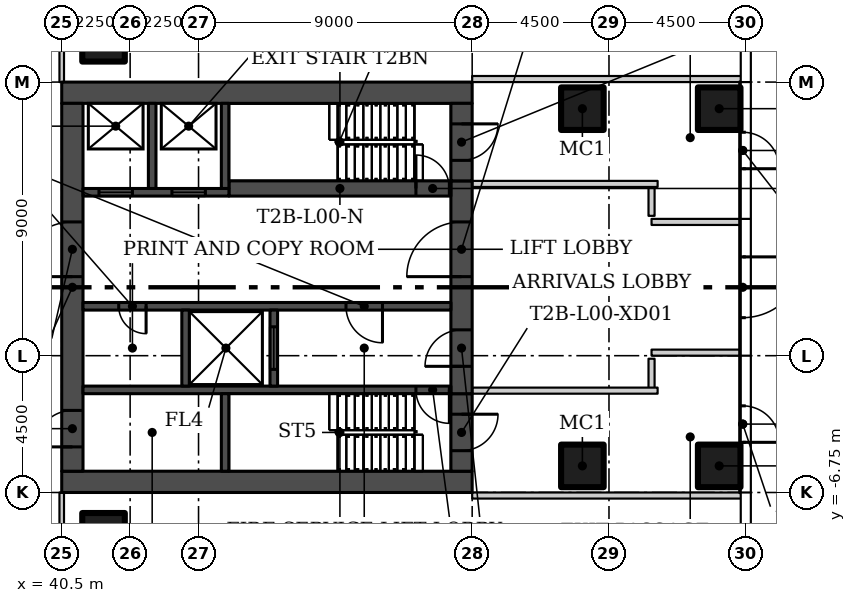
"""IFC4 building model, lengths in metres.
Left out: names, types, materials, properties, quantities, classifications, styles, units other than length and angle.
Written with IfcOpenShell. Run it as: python <this file> out.ifc"""

import sys

from ifc_helpers import new_model, si_unit, direction, frame, frame_2d, origin, origin_2d, place, context, subcontext, project, spatial, rectangle, hollow_rectangle, extrude, element, fill, save


model = new_model("IFC4")
c1 = context("Model", 3, precision=1e-05, world=origin(), true_north=direction((0.0, 1.0)))
c2 = subcontext(c1, "Body", "Model", "MODEL_VIEW")
j1 = project(units=[si_unit("LENGTHUNIT", "METRE"), si_unit("PLANEANGLEUNIT", "RADIAN")], contexts=[c1])
p1 = place(None, origin())
s1 = spatial("IfcSite", under=j1, at=p1, CompositionType="ELEMENT")
p2 = place(p1, origin())
s2 = spatial("IfcBuilding", under=s1, at=p2, CompositionType="ELEMENT")
p3 = place(p2, origin())
s3 = spatial("IfcBuildingStorey", under=s2, at=p3, CompositionType="ELEMENT", Elevation=0.0)
for number, where in (
    (1, (41.875, 8.125, 0.0)),
    (2, (41.875, -8.125, 0.0)),
    (3, (57.625, -5.875, 0.0)),
    (4, (62.125, -5.875, 0.0)),
    (5, (57.625, 5.875, 0.0)),
    (6, (62.125, 5.875, 0.0)),
):
    element("IfcColumn", number, at=place(p3, frame(where)), inside=s3, PredefinedType="COLUMN", context=c2, shape_type="SweptSolid", body=[
        extrude(hollow_rectangle(XDim=1.4, YDim=1.4, WallThickness=0.06, at=origin_2d()), origin(), (0.0, 0.0, 1.0), 6.1),
    ])
p4 = place(p3, frame((59.9, 2.15, 0.0)))
e7 = element("IfcWall", 7, at=p4, inside=s3, PredefinedType="PARTITIONING", context=c2, shape_type="SweptSolid", body=[
    extrude(rectangle(XDim=3.005, YDim=0.2, at=frame_2d((1.502, 0.0))), origin(), (0.0, 0.0, 1.0), 6.1),
])
for number, where, z_axis, x_axis in (
    (8, (59.9, 3.4, 0.0), (0.0, 0.0, 1.0), (0.0, -1.0, 0.0)),
    (9, (59.9, -2.35, 0.0), (0.0, 0.0, 1.0), (0.0, -1.0, 0.0)),
):
    element("IfcWall", number, at=place(p3, frame(where, z_axis=z_axis, x_axis=x_axis)), inside=s3, PredefinedType="PARTITIONING", context=c2, shape_type="SweptSolid", body=[
        extrude(rectangle(XDim=1.05, YDim=0.2, at=frame_2d((0.525, 0.0))), origin(), (0.0, 0.0, 1.0), 6.1),
    ])
p5 = place(p3, frame((54.0, 3.4, 0.0)))
e10 = element("IfcWall", 10, at=p5, inside=s3, PredefinedType="PARTITIONING", context=c2, shape_type="SweptSolid", body=[
    extrude(rectangle(XDim=6.1, YDim=0.2, at=frame_2d((3.05, 0.0))), origin(), (0.0, 0.0, 1.0), 6.1),
])
p6 = place(p3, frame((62.905, 6.85, 0.0), z_axis=(0.0, 0.0, 1.0), x_axis=(-1.0, 0.0, 0.0)))
e11 = element("IfcWall", 11, at=p6, inside=s3, PredefinedType="PARTITIONING", context=c2, shape_type="SweptSolid", body=[
    extrude(rectangle(XDim=8.905, YDim=0.2, at=frame_2d((4.453, 0.0))), origin(), (0.0, 0.0, 1.0), 6.1),
])
p7 = place(p3, frame((60.1, -3.4, 0.0), z_axis=(0.0, 0.0, 1.0), x_axis=(-1.0, 0.0, 0.0)))
e12 = element("IfcWall", 12, at=p7, inside=s3, PredefinedType="PARTITIONING", context=c2, shape_type="SweptSolid", body=[
    extrude(rectangle(XDim=6.1, YDim=0.2, at=frame_2d((3.05, 0.0))), origin(), (0.0, 0.0, 1.0), 6.1),
])
p8 = place(p3, frame((62.905, -2.15, 0.0), z_axis=(0.0, 0.0, 1.0), x_axis=(-1.0, 0.0, 0.0)))
e13 = element("IfcWall", 13, at=p8, inside=s3, PredefinedType="PARTITIONING", context=c2, shape_type="SweptSolid", body=[
    extrude(rectangle(XDim=3.005, YDim=0.2, at=frame_2d((1.502, 0.0))), origin(), (0.0, 0.0, 1.0), 6.1),
])
p9 = place(p3, frame((54.0, -6.85, 0.0)))
e14 = element("IfcWall", 14, at=p9, inside=s3, PredefinedType="PARTITIONING", context=c2, shape_type="SweptSolid", body=[
    extrude(rectangle(XDim=8.905, YDim=0.2, at=frame_2d((4.453, 0.0))), origin(), (0.0, 0.0, 1.0), 6.1),
])
p10 = place(p3, frame((40.5, -17.275, 0.0), z_axis=(0.0, 0.0, 1.0), x_axis=(0.0, 1.0, 0.0)))
e15 = element("IfcWall", 15, at=p10, inside=s3, PredefinedType="PARTITIONING", context=c2, shape_type="SweptSolid", body=[
    extrude(rectangle(XDim=10.525, YDim=0.15, at=frame_2d((5.262, 0.0))), origin(), (0.0, 0.0, 1.0), 6.1),
])
p11 = place(p10, frame((4.325, 0.0, 0.0)))
e16 = element("IfcOpeningElement", 16, at=p11, cuts=e15, PredefinedType="OPENING", context=c2, shape_type="SweptSolid", body=[
    extrude(rectangle(XDim=1.8, YDim=2.4, at=frame_2d((0.9, 1.2))), frame((0.0, 0.085, 0.0), z_axis=(0.0, -1.0, 0.0), x_axis=(1.0, 0.0, 0.0)), (0.0, 0.0, 1.0), 0.17),
])
p12 = place(p3, frame((40.5, 6.75, 0.0), z_axis=(0.0, 0.0, 1.0), x_axis=(0.0, 1.0, 0.0)))
e17 = element("IfcWall", 17, at=p12, inside=s3, PredefinedType="PARTITIONING", context=c2, shape_type="SweptSolid", body=[
    extrude(rectangle(XDim=6.025, YDim=0.15, at=frame_2d((3.012, 0.0))), origin(), (0.0, 0.0, 1.0), 6.1),
])
p13 = place(p12, frame((2.15, 0.0, 0.0)))
e18 = element("IfcOpeningElement", 18, at=p13, cuts=e17, PredefinedType="OPENING", context=c2, shape_type="SweptSolid", body=[
    extrude(rectangle(XDim=1.8, YDim=2.4, at=frame_2d((0.9, 1.2))), frame((0.0, 0.085, 0.0), z_axis=(0.0, -1.0, 0.0), x_axis=(1.0, 0.0, 0.0)), (0.0, 0.0, 1.0), 0.17),
])
p14 = place(p3, frame((62.9, 6.757, 0.0), z_axis=(0.0, 0.0, 1.0), x_axis=(0.0, -1.0, 0.0)))
e19 = element("IfcWall", 19, at=p14, inside=s3, PredefinedType="SOLIDWALL", context=c2, shape_type="SweptSolid", body=[
    extrude(rectangle(XDim=4.514, YDim=0.2, at=frame_2d((2.257, 0.0))), origin(), (0.0, 0.0, 1.0), 3.0),
])
p15 = place(p14, frame((1.657, 0.0, 0.0)))
e20 = element("IfcOpeningElement", 20, at=p15, cuts=e19, PredefinedType="OPENING", context=c2, shape_type="SweptSolid", body=[
    extrude(rectangle(XDim=1.2, YDim=2.4, at=frame_2d((0.6, 1.2))), frame((0.0, 0.11, 0.0), z_axis=(0.0, -1.0, 0.0), x_axis=(1.0, 0.0, 0.0)), (0.0, 0.0, 1.0), 0.22),
])
p16 = place(p3, frame((62.9, -2.243, 0.0), z_axis=(0.0, 0.0, 1.0), x_axis=(0.0, -1.0, 0.0)))
e21 = element("IfcWall", 21, at=p16, inside=s3, PredefinedType="SOLIDWALL", context=c2, shape_type="SweptSolid", body=[
    extrude(rectangle(XDim=4.514, YDim=0.2, at=frame_2d((2.257, 0.0))), origin(), (0.0, 0.0, 1.0), 3.0),
])
p17 = place(p16, frame((1.657, 0.0, 0.0)))
e22 = element("IfcOpeningElement", 22, at=p17, cuts=e21, PredefinedType="OPENING", context=c2, shape_type="SweptSolid", body=[
    extrude(rectangle(XDim=1.2, YDim=2.4, at=frame_2d((0.6, 1.2))), frame((0.0, 0.11, 0.0), z_axis=(0.0, -1.0, 0.0), x_axis=(1.0, 0.0, 0.0)), (0.0, 0.0, 1.0), 0.22),
])
p18 = place(p3, frame((62.9, 2.217, 0.0), z_axis=(0.0, 0.0, 1.0), x_axis=(0.0, -1.0, 0.0)))
e23 = element("IfcWall", 23, at=p18, inside=s3, PredefinedType="SOLIDWALL", context=c2, shape_type="SweptSolid", body=[
    extrude(rectangle(XDim=4.434, YDim=0.2, at=frame_2d((2.217, 0.0))), origin(), (0.0, 0.0, 1.0), 3.0),
])
p19 = place(p18, frame((1.217, 0.0, 0.0)))
e24 = element("IfcOpeningElement", 24, at=p19, cuts=e23, PredefinedType="OPENING", context=c2, shape_type="SweptSolid", body=[
    extrude(rectangle(XDim=2.0, YDim=2.4, at=frame_2d((1.0, 1.2))), frame((0.0, 0.11, 0.0), z_axis=(0.0, -1.0, 0.0), x_axis=(1.0, 0.0, 0.0)), (0.0, 0.0, 1.0), 0.22),
])
for number, where, z_axis, x_axis in (
    (25, (54.0, -6.4, 0.0), (0.0, 0.0, 1.0), (-1.0, 0.0, 0.0)),
    (26, (54.0, 6.4, 0.0), (0.0, 0.0, 1.0), (-1.0, 0.0, 0.0)),
):
    element("IfcWall", number, at=place(p3, frame(where, z_axis=z_axis, x_axis=x_axis)), inside=s3, PredefinedType="SHEAR", context=c2, shape_type="SweptSolid", body=[
        extrude(rectangle(XDim=13.5, YDim=0.7, at=frame_2d((6.75, 0.0))), origin(), (0.0, 0.0, 1.0), 6.1),
    ])
p20 = place(p3, frame((53.65, -3.5, 0.0), z_axis=(0.0, 0.0, 1.0), x_axis=(0.0, -1.0, 0.0)))
e27 = element("IfcWall", 27, at=p20, inside=s3, PredefinedType="SHEAR", context=c2, shape_type="SweptSolid", body=[
    extrude(rectangle(XDim=2.55, YDim=0.7, at=frame_2d((1.275, 0.0))), origin(), (0.0, 0.0, 1.0), 6.1),
])
p21 = place(p20, frame((0.675, 0.0, 0.0)))
e28 = element("IfcOpeningElement", 28, at=p21, cuts=e27, PredefinedType="OPENING", context=c2, shape_type="SweptSolid", body=[
    extrude(rectangle(XDim=1.2, YDim=2.4, at=frame_2d((0.6, 1.2))), frame((0.0, 0.36, 0.0), z_axis=(0.0, -1.0, 0.0), x_axis=(1.0, 0.0, 0.0)), (0.0, 0.0, 1.0), 0.72),
])
p22 = place(p3, frame((53.65, -3.5, 0.0), z_axis=(0.0, 0.0, 1.0), x_axis=(0.0, 1.0, 0.0)))
e29 = element("IfcWall", 29, at=p22, inside=s3, PredefinedType="SHEAR", context=c2, shape_type="SweptSolid", body=[
    extrude(rectangle(XDim=7.0, YDim=0.7, at=frame_2d((3.5, 0.0))), origin(), (0.0, 0.0, 1.0), 6.1),
])
p23 = place(p22, frame((0.9, 0.0, 0.0)))
e30 = element("IfcOpeningElement", 30, at=p23, cuts=e29, PredefinedType="OPENING", context=c2, shape_type="SweptSolid", body=[
    extrude(rectangle(XDim=1.2, YDim=2.1, at=frame_2d((0.6, 1.05))), frame((0.0, 0.36, 0.0), z_axis=(0.0, -1.0, 0.0), x_axis=(1.0, 0.0, 0.0)), (0.0, 0.0, 1.0), 0.72),
])
p24 = place(p22, frame((3.85, 0.0, 0.0)))
e31 = element("IfcOpeningElement", 31, at=p24, cuts=e29, PredefinedType="OPENING", context=c2, shape_type="SweptSolid", body=[
    extrude(rectangle(XDim=1.8, YDim=2.4, at=frame_2d((0.9, 1.2))), frame((0.0, 0.36, 0.0), z_axis=(0.0, -1.0, 0.0), x_axis=(1.0, 0.0, 0.0)), (0.0, 0.0, 1.0), 0.72),
])
p25 = place(p3, frame((53.65, 6.05, 0.0), z_axis=(0.0, 0.0, 1.0), x_axis=(0.0, -1.0, 0.0)))
e32 = element("IfcWall", 32, at=p25, inside=s3, PredefinedType="SHEAR", context=c2, shape_type="SweptSolid", body=[
    extrude(rectangle(XDim=2.55, YDim=0.7, at=frame_2d((1.275, 0.0))), origin(), (0.0, 0.0, 1.0), 6.1),
])
p26 = place(p25, frame((0.675, 0.0, 0.0)))
e33 = element("IfcOpeningElement", 33, at=p26, cuts=e32, PredefinedType="OPENING", context=c2, shape_type="SweptSolid", body=[
    extrude(rectangle(XDim=1.2, YDim=2.4, at=frame_2d((0.6, 1.2))), frame((0.0, 0.36, 0.0), z_axis=(0.0, -1.0, 0.0), x_axis=(1.0, 0.0, 0.0)), (0.0, 0.0, 1.0), 0.72),
])
p27 = place(p3, frame((40.85, -6.05, 0.0), z_axis=(0.0, 0.0, 1.0), x_axis=(0.0, 1.0, 0.0)))
e34 = element("IfcWall", 34, at=p27, inside=s3, PredefinedType="SHEAR", context=c2, shape_type="SweptSolid", body=[
    extrude(rectangle(XDim=12.1, YDim=0.7, at=frame_2d((6.05, 0.0))), origin(), (0.0, 0.0, 1.0), 6.1),
])
p28 = place(p27, frame((0.8, 0.0, 0.0)))
e35 = element("IfcOpeningElement", 35, at=p28, cuts=e34, PredefinedType="OPENING", context=c2, shape_type="SweptSolid", body=[
    extrude(rectangle(XDim=1.2, YDim=2.1, at=frame_2d((0.6, 1.05))), frame((0.0, 0.36, 0.0), z_axis=(0.0, -1.0, 0.0), x_axis=(1.0, 0.0, 0.0)), (0.0, 0.0, 1.0), 0.72),
])
p29 = place(p27, frame((6.4, 0.0, 0.0)))
e36 = element("IfcOpeningElement", 36, at=p29, cuts=e34, PredefinedType="OPENING", context=c2, shape_type="SweptSolid", body=[
    extrude(rectangle(XDim=1.8, YDim=2.4, at=frame_2d((0.9, 1.2))), frame((0.0, 0.36, 0.0), z_axis=(0.0, -1.0, 0.0), x_axis=(1.0, 0.0, 0.0)), (0.0, 0.0, 1.0), 0.72),
])
p30 = place(p3, frame((53.3, -3.375, 0.0), z_axis=(0.0, 0.0, 1.0), x_axis=(-1.0, 0.0, 0.0)))
e37 = element("IfcWall", 37, at=p30, inside=s3, PredefinedType="SHEAR", context=c2, shape_type="SweptSolid", body=[
    extrude(rectangle(XDim=12.1, YDim=0.25, at=frame_2d((6.05, 0.0))), origin(), (0.0, 0.0, 1.0), 6.1),
])
p31 = place(p30, frame((0.05, 0.0, 0.0)))
e38 = element("IfcOpeningElement", 38, at=p31, cuts=e37, PredefinedType="OPENING", context=c2, shape_type="SweptSolid", body=[
    extrude(rectangle(XDim=1.1, YDim=2.1, at=frame_2d((0.55, 1.05))), frame((0.0, 0.135, 0.0), z_axis=(0.0, -1.0, 0.0), x_axis=(1.0, 0.0, 0.0)), (0.0, 0.0, 1.0), 0.27),
])
p32 = place(p3, frame((45.875, -6.05, 0.0), z_axis=(0.0, 0.0, 1.0), x_axis=(0.0, 1.0, 0.0)))
e39 = element("IfcWall", 39, at=p32, inside=s3, PredefinedType="SHEAR", context=c2, shape_type="SweptSolid", body=[
    extrude(rectangle(XDim=2.55, YDim=0.25, at=frame_2d((1.275, 0.0))), origin(), (0.0, 0.0, 1.0), 6.1),
])
p33 = place(p3, frame((53.3, -0.625, 0.0), z_axis=(0.0, 0.0, 1.0), x_axis=(-1.0, 0.0, 0.0)))
e40 = element("IfcWall", 40, at=p33, inside=s3, PredefinedType="SHEAR", context=c2, shape_type="SweptSolid", body=[
    extrude(rectangle(XDim=12.1, YDim=0.25, at=frame_2d((6.05, 0.0))), origin(), (0.0, 0.0, 1.0), 6.1),
])
p34 = place(p33, frame((2.25, 0.0, 0.0)))
e41 = element("IfcOpeningElement", 41, at=p34, cuts=e40, PredefinedType="OPENING", context=c2, shape_type="SweptSolid", body=[
    extrude(rectangle(XDim=1.2, YDim=2.1, at=frame_2d((0.6, 1.05))), frame((0.0, 0.135, 0.0), z_axis=(0.0, -1.0, 0.0), x_axis=(1.0, 0.0, 0.0)), (0.0, 0.0, 1.0), 0.27),
])
p35 = place(p33, frame((10.025, 0.0, 0.0)))
e42 = element("IfcOpeningElement", 42, at=p35, cuts=e40, PredefinedType="OPENING", context=c2, shape_type="SweptSolid", body=[
    extrude(rectangle(XDim=0.9, YDim=2.1, at=frame_2d((0.45, 1.05))), frame((0.0, 0.135, 0.0), z_axis=(0.0, -1.0, 0.0), x_axis=(1.0, 0.0, 0.0)), (0.0, 0.0, 1.0), 0.27),
])
p36 = place(p3, frame((47.475, -3.25, 0.0), z_axis=(0.0, 0.0, 1.0), x_axis=(0.0, 1.0, 0.0)))
e43 = element("IfcWall", 43, at=p36, inside=s3, PredefinedType="SHEAR", context=c2, shape_type="SweptSolid", body=[
    extrude(rectangle(XDim=2.5, YDim=0.25, at=frame_2d((1.25, 0.0))), origin(), (0.0, 0.0, 1.0), 6.1),
])
p37 = place(p36, frame((0.55, 0.0, 0.0)))
e44 = element("IfcOpeningElement", 44, at=p37, cuts=e43, PredefinedType="OPENING", context=c2, shape_type="SweptSolid", body=[
    extrude(rectangle(XDim=1.4, YDim=2.4, at=frame_2d((0.7, 1.2))), frame((0.0, 0.135, 0.0), z_axis=(0.0, -1.0, 0.0), x_axis=(1.0, 0.0, 0.0)), (0.0, 0.0, 1.0), 0.27),
])
p38 = place(p3, frame((44.575, -3.25, 0.0), z_axis=(0.0, 0.0, 1.0), x_axis=(0.0, 1.0, 0.0)))
e45 = element("IfcWall", 45, at=p38, inside=s3, PredefinedType="SHEAR", context=c2, shape_type="SweptSolid", body=[
    extrude(rectangle(XDim=2.5, YDim=0.25, at=frame_2d((1.25, 0.0))), origin(), (0.0, 0.0, 1.0), 6.1),
])
p39 = place(p3, frame((46.0, 3.25, 0.0)))
e46 = element("IfcWall", 46, at=p39, inside=s3, PredefinedType="SHEAR", context=c2, shape_type="SweptSolid", body=[
    extrude(rectangle(XDim=7.3, YDim=0.5, at=frame_2d((3.65, 0.0))), origin(), (0.0, 0.0, 1.0), 6.1),
])
p40 = place(p39, frame((6.15, 0.0, 0.0)))
e47 = element("IfcOpeningElement", 47, at=p40, cuts=e46, PredefinedType="OPENING", context=c2, shape_type="SweptSolid", body=[
    extrude(rectangle(XDim=1.1, YDim=2.1, at=frame_2d((0.55, 1.05))), frame((0.0, 0.26, 0.0), z_axis=(0.0, -1.0, 0.0), x_axis=(1.0, 0.0, 0.0)), (0.0, 0.0, 1.0), 0.52),
])
p41 = place(p3, frame((46.0, 3.125, 0.0), z_axis=(0.0, 0.0, 1.0), x_axis=(-1.0, 0.0, 0.0)))
e48 = element("IfcWall", 48, at=p41, inside=s3, PredefinedType="SHEAR", context=c2, shape_type="SweptSolid", body=[
    extrude(rectangle(XDim=4.8, YDim=0.25, at=frame_2d((2.4, 0.0))), origin(), (0.0, 0.0, 1.0), 6.1),
])
p42 = place(p41, frame((0.775, 0.0, 0.0)))
e49 = element("IfcOpeningElement", 49, at=p42, cuts=e48, PredefinedType="OPENING", context=c2, shape_type="SweptSolid", body=[
    extrude(rectangle(XDim=1.1, YDim=2.1, at=frame_2d((0.55, 1.05))), frame((0.0, 0.135, 0.0), z_axis=(0.0, -1.0, 0.0), x_axis=(1.0, 0.0, 0.0)), (0.0, 0.0, 1.0), 0.27),
])
p43 = place(p41, frame((3.175, 0.0, 0.0)))
e50 = element("IfcOpeningElement", 50, at=p43, cuts=e48, PredefinedType="OPENING", context=c2, shape_type="SweptSolid", body=[
    extrude(rectangle(XDim=1.1, YDim=2.1, at=frame_2d((0.55, 1.05))), frame((0.0, 0.135, 0.0), z_axis=(0.0, -1.0, 0.0), x_axis=(1.0, 0.0, 0.0)), (0.0, 0.0, 1.0), 0.27),
])
for number, where, z_axis, x_axis in (
    (51, (45.875, 3.25, 0.0), (0.0, 0.0, 1.0), (0.0, 1.0, 0.0)),
    (52, (43.475, 3.25, 0.0), (0.0, 0.0, 1.0), (0.0, 1.0, 0.0)),
):
    element("IfcWall", number, at=place(p3, frame(where, z_axis=z_axis, x_axis=x_axis)), inside=s3, PredefinedType="SHEAR", context=c2, shape_type="SweptSolid", body=[
        extrude(rectangle(XDim=2.8, YDim=0.25, at=frame_2d((1.4, 0.0))), origin(), (0.0, 0.0, 1.0), 6.1),
    ])
p44 = place(p15, origin())
e53 = element("IfcDoor", 53, at=p44, inside=s3, OperationType="SINGLE_SWING_RIGHT", PredefinedType="DOOR", context=c2, shape_type="SweptSolid", body=[
    extrude(rectangle(XDim=1.2, YDim=2.4, at=frame_2d((0.6, 1.2))), frame((0.0, 0.025, 0.0), z_axis=(0.0, -1.0, 0.0), x_axis=(1.0, 0.0, 0.0)), (0.0, 0.0, 1.0), 0.05),
])
fill(e20, e53)
p45 = place(p17, origin())
e54 = element("IfcDoor", 54, at=p45, inside=s3, OperationType="SINGLE_SWING_RIGHT", PredefinedType="DOOR", context=c2, shape_type="SweptSolid", body=[
    extrude(rectangle(XDim=1.2, YDim=2.4, at=frame_2d((0.6, 1.2))), frame((0.0, 0.025, 0.0), z_axis=(0.0, -1.0, 0.0), x_axis=(1.0, 0.0, 0.0)), (0.0, 0.0, 1.0), 0.05),
])
fill(e22, e54)
p46 = place(p19, origin())
e55 = element("IfcDoor", 55, at=p46, inside=s3, OperationType="DOUBLE_DOOR_SINGLE_SWING", PredefinedType="DOOR", context=c2, shape_type="SweptSolid", body=[
    extrude(rectangle(XDim=2.0, YDim=2.4, at=frame_2d((1.0, 1.2))), frame((0.0, 0.025, 0.0), z_axis=(0.0, -1.0, 0.0), x_axis=(1.0, 0.0, 0.0)), (0.0, 0.0, 1.0), 0.05),
])
fill(e24, e55)
p47 = place(p21, origin())
e56 = element("IfcDoor", 56, at=p47, inside=s3, OperationType="SINGLE_SWING_RIGHT", PredefinedType="DOOR", context=c2, shape_type="SweptSolid", body=[
    extrude(rectangle(XDim=1.2, YDim=2.4, at=frame_2d((0.6, 1.2))), frame((0.0, 0.025, 0.0), z_axis=(0.0, -1.0, 0.0), x_axis=(1.0, 0.0, 0.0)), (0.0, 0.0, 1.0), 0.05),
])
fill(e28, e56)
p48 = place(p23, origin())
e57 = element("IfcDoor", 57, at=p48, inside=s3, OperationType="SINGLE_SWING_LEFT", PredefinedType="DOOR", context=c2, shape_type="SweptSolid", body=[
    extrude(rectangle(XDim=1.2, YDim=2.1, at=frame_2d((0.6, 1.05))), frame((0.0, 0.025, 0.0), z_axis=(0.0, -1.0, 0.0), x_axis=(1.0, 0.0, 0.0)), (0.0, 0.0, 1.0), 0.05),
])
fill(e30, e57)
p49 = place(p24, origin())
e58 = element("IfcDoor", 58, at=p49, inside=s3, OperationType="DOUBLE_DOOR_SINGLE_SWING", PredefinedType="DOOR", context=c2, shape_type="SweptSolid", body=[
    extrude(rectangle(XDim=1.8, YDim=2.4, at=frame_2d((0.9, 1.2))), frame((0.0, 0.025, 0.0), z_axis=(0.0, -1.0, 0.0), x_axis=(1.0, 0.0, 0.0)), (0.0, 0.0, 1.0), 0.05),
])
fill(e31, e58)
p50 = place(p26, origin())
e59 = element("IfcDoor", 59, at=p50, inside=s3, OperationType="SINGLE_SWING_LEFT", PredefinedType="DOOR", context=c2, shape_type="SweptSolid", body=[
    extrude(rectangle(XDim=1.2, YDim=2.4, at=frame_2d((0.6, 1.2))), frame((0.0, 0.025, 0.0), z_axis=(0.0, -1.0, 0.0), x_axis=(1.0, 0.0, 0.0)), (0.0, 0.0, 1.0), 0.05),
])
fill(e33, e59)
p51 = place(p28, origin())
e60 = element("IfcDoor", 60, at=p51, inside=s3, OperationType="SINGLE_SWING_LEFT", PredefinedType="DOOR", context=c2, shape_type="SweptSolid", body=[
    extrude(rectangle(XDim=1.2, YDim=2.1, at=frame_2d((0.6, 1.05))), frame((0.0, 0.025, 0.0), z_axis=(0.0, -1.0, 0.0), x_axis=(1.0, 0.0, 0.0)), (0.0, 0.0, 1.0), 0.05),
])
fill(e35, e60)
p52 = place(p29, origin())
e61 = element("IfcDoor", 61, at=p52, inside=s3, OperationType="DOUBLE_DOOR_SINGLE_SWING", PredefinedType="DOOR", context=c2, shape_type="SweptSolid", body=[
    extrude(rectangle(XDim=1.8, YDim=2.4, at=frame_2d((0.9, 1.2))), frame((0.0, 0.025, 0.0), z_axis=(0.0, -1.0, 0.0), x_axis=(1.0, 0.0, 0.0)), (0.0, 0.0, 1.0), 0.05),
])
fill(e36, e61)
p53 = place(p31, origin())
e62 = element("IfcDoor", 62, at=p53, inside=s3, OperationType="SINGLE_SWING_LEFT", PredefinedType="DOOR", context=c2, shape_type="SweptSolid", body=[
    extrude(rectangle(XDim=1.1, YDim=2.1, at=frame_2d((0.55, 1.05))), frame((0.0, 0.025, 0.0), z_axis=(0.0, -1.0, 0.0), x_axis=(1.0, 0.0, 0.0)), (0.0, 0.0, 1.0), 0.05),
])
fill(e38, e62)
p54 = place(p34, origin())
e63 = element("IfcDoor", 63, at=p54, inside=s3, OperationType="SINGLE_SWING_LEFT", PredefinedType="DOOR", context=c2, shape_type="SweptSolid", body=[
    extrude(rectangle(XDim=1.2, YDim=2.1, at=frame_2d((0.6, 1.05))), frame((0.0, 0.025, 0.0), z_axis=(0.0, -1.0, 0.0), x_axis=(1.0, 0.0, 0.0)), (0.0, 0.0, 1.0), 0.05),
])
fill(e41, e63)
p55 = place(p35, origin())
e64 = element("IfcDoor", 64, at=p55, inside=s3, OperationType="SINGLE_SWING_RIGHT", PredefinedType="DOOR", context=c2, shape_type="SweptSolid", body=[
    extrude(rectangle(XDim=0.9, YDim=2.1, at=frame_2d((0.45, 1.05))), frame((0.0, 0.025, 0.0), z_axis=(0.0, -1.0, 0.0), x_axis=(1.0, 0.0, 0.0)), (0.0, 0.0, 1.0), 0.05),
])
fill(e42, e64)
p56 = place(p37, origin())
e65 = element("IfcDoor", 65, at=p56, inside=s3, OperationType="SLIDING_TO_LEFT", PredefinedType="DOOR", context=c2, shape_type="SweptSolid", body=[
    extrude(rectangle(XDim=1.4, YDim=2.4, at=frame_2d((0.7, 1.2))), frame((0.0, 0.025, 0.0), z_axis=(0.0, -1.0, 0.0), x_axis=(1.0, 0.0, 0.0)), (0.0, 0.0, 1.0), 0.05),
])
fill(e44, e65)
p57 = place(p40, origin())
e66 = element("IfcDoor", 66, at=p57, inside=s3, OperationType="SINGLE_SWING_RIGHT", PredefinedType="DOOR", context=c2, shape_type="SweptSolid", body=[
    extrude(rectangle(XDim=1.1, YDim=2.1, at=frame_2d((0.55, 1.05))), frame((0.0, 0.025, 0.0), z_axis=(0.0, -1.0, 0.0), x_axis=(1.0, 0.0, 0.0)), (0.0, 0.0, 1.0), 0.05),
])
fill(e47, e66)
p58 = place(p42, origin())
e67 = element("IfcDoor", 67, at=p58, inside=s3, OperationType="SLIDING_TO_LEFT", PredefinedType="DOOR", context=c2, shape_type="SweptSolid", body=[
    extrude(rectangle(XDim=1.1, YDim=2.1, at=frame_2d((0.55, 1.05))), frame((0.0, 0.025, 0.0), z_axis=(0.0, -1.0, 0.0), x_axis=(1.0, 0.0, 0.0)), (0.0, 0.0, 1.0), 0.05),
])
fill(e49, e67)
p59 = place(p43, origin())
e68 = element("IfcDoor", 68, at=p59, inside=s3, OperationType="SLIDING_TO_LEFT", PredefinedType="DOOR", context=c2, shape_type="SweptSolid", body=[
    extrude(rectangle(XDim=1.1, YDim=2.1, at=frame_2d((0.55, 1.05))), frame((0.0, 0.025, 0.0), z_axis=(0.0, -1.0, 0.0), x_axis=(1.0, 0.0, 0.0)), (0.0, 0.0, 1.0), 0.05),
])
fill(e50, e68)
save(model, sys.argv[1])
